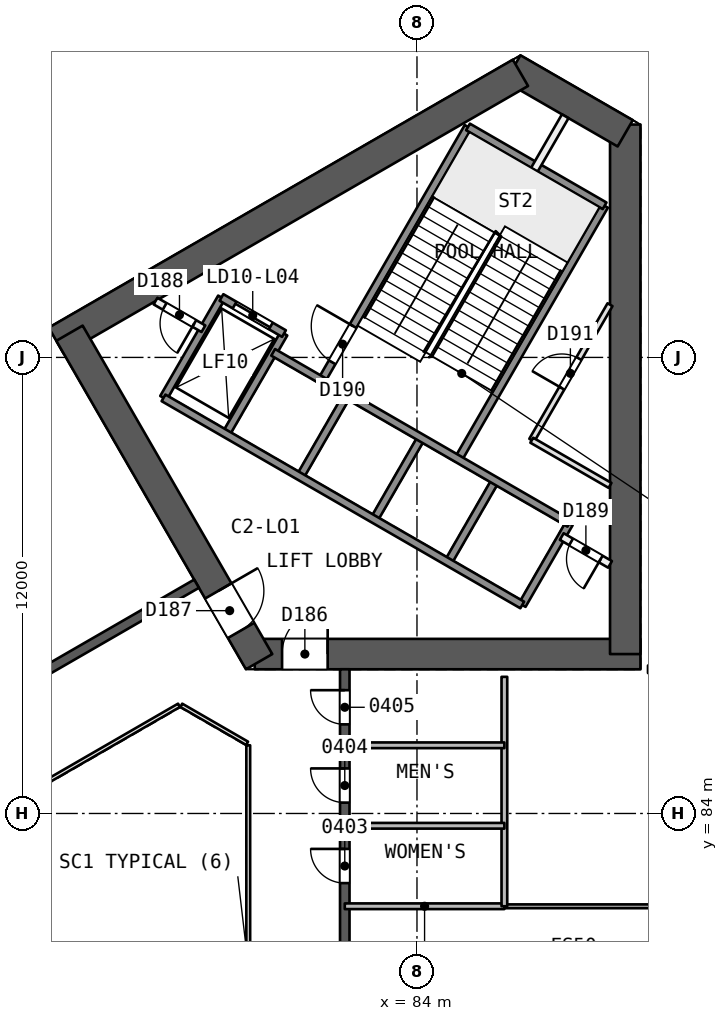
"""IFC4 building model, lengths in metres.
Left out: names, types, materials, properties, quantities, classifications, styles, units other than length and angle.
Written with IfcOpenShell. Run it as: python <this file> out.ifc"""

import sys

from ifc_helpers import new_model, si_unit, direction, frame, frame_2d, origin, place, context, subcontext, project, spatial, rectangle, extrude, element, fill, save


model = new_model("IFC4")
c1 = context("Model", 3, precision=1e-05, world=origin(), true_north=direction((0.0, 1.0)))
c2 = subcontext(c1, "Body", "Model", "MODEL_VIEW")
j1 = project(units=[si_unit("LENGTHUNIT", "METRE"), si_unit("PLANEANGLEUNIT", "RADIAN")], contexts=[c1])
p1 = place(None, origin())
s1 = spatial("IfcSite", under=j1, at=p1, CompositionType="ELEMENT")
p2 = place(p1, origin())
s2 = spatial("IfcBuilding", under=s1, at=p2, CompositionType="ELEMENT")
p3 = place(p2, frame((0.0, 0.0, 25.4)))
s3 = spatial("IfcBuildingStorey", under=s2, at=p3, CompositionType="ELEMENT", Elevation=25.4)
p4 = place(p3, frame((79.731, 88.194, 0.0), z_axis=(0.0, 0.0, 1.0), x_axis=(1.0, 0.0, 0.0)))
e1 = element("IfcWall", 1, at=p4, inside=s3, PredefinedType="SHEAR", context=c2, shape_type="SweptSolid", body=[
    extrude(rectangle(XDim=10.149, YDim=0.8, at=frame_2d((5.074, 0.0))), origin(), (0.0, 0.0, 1.0), 4.6),
])
p5 = place(p4, frame((0.719, 0.0, 0.0)))
e2 = element("IfcOpeningElement", 2, at=p5, cuts=e1, PredefinedType="OPENING", context=c2, shape_type="SweptSolid", body=[
    extrude(rectangle(XDim=1.2, YDim=2.1, at=frame_2d((0.6, 1.05))), frame((0.0, 0.411, 0.0), z_axis=(0.0, -1.0, 0.0), x_axis=(1.0, 0.0, 0.0)), (0.0, 0.0, 1.0), 0.821),
])
p6 = place(p3, frame((89.48, 88.194, 0.0), z_axis=(0.0, 0.0, 1.0), x_axis=(0.0, 1.0, 0.0)))
e3 = element("IfcWall", 3, at=p6, inside=s3, PredefinedType="SHEAR", context=c2, shape_type="SweptSolid", body=[
    extrude(rectangle(XDim=13.933, YDim=0.8, at=frame_2d((6.967, 0.0))), origin(), (0.0, 0.0, 1.0), 4.6),
])
p7 = place(p3, frame((89.48, 101.897, 0.0), z_axis=(0.0, 0.0, 1.0), x_axis=(-0.866034355626, 0.499984494636, 0.0)))
e4 = element("IfcWall", 4, at=p7, inside=s3, PredefinedType="SHEAR", context=c2, shape_type="SweptSolid", body=[
    extrude(rectangle(XDim=3.414, YDim=0.8, at=frame_2d((1.707, 0.0))), origin(), (0.0, 0.0, 1.0), 4.6),
])
p8 = place(p3, frame((86.723, 103.488, 0.0), z_axis=(0.0, 0.0, 1.0), x_axis=(-0.866032504327, -0.499987701298, 0.0)))
e5 = element("IfcWall", 5, at=p8, inside=s3, PredefinedType="SHEAR", context=c2, shape_type="SweptSolid", body=[
    extrude(rectangle(XDim=14.102, YDim=0.8, at=frame_2d((7.051, 0.0))), origin(), (0.0, 0.0, 1.0), 4.6),
])
p9 = place(p3, frame((74.856, 96.637, 0.0), z_axis=(0.0, 0.0, 1.0), x_axis=(0.499993500917, -0.866029155999, 0.0)))
e6 = element("IfcWall", 6, at=p9, inside=s3, PredefinedType="SHEAR", context=c2, shape_type="SweptSolid", body=[
    extrude(rectangle(XDim=9.98, YDim=0.8, at=frame_2d((4.99, 0.0))), origin(), (0.0, 0.0, 1.0), 4.6),
])
p10 = place(p9, frame((7.83, 0.0, 0.0)))
e7 = element("IfcOpeningElement", 7, at=p10, cuts=e6, PredefinedType="OPENING", context=c2, shape_type="SweptSolid", body=[
    extrude(rectangle(XDim=1.2, YDim=2.1, at=frame_2d((0.6, 1.05))), frame((0.0, 0.411, 0.0), z_axis=(0.0, -1.0, 0.0), x_axis=(1.0, 0.0, 0.0)), (0.0, 0.0, 1.0), 0.821),
])
p11 = place(p3, frame((82.1, 72.206, 0.0), z_axis=(0.0, 0.0, 1.0), x_axis=(0.0, 1.0, 0.0)))
e8 = element("IfcWall", 8, at=p11, inside=s3, PredefinedType="SHEAR", context=c2, shape_type="SweptSolid", body=[
    extrude(rectangle(XDim=15.588, YDim=0.25, at=frame_2d((7.794, 0.0))), origin(), (0.0, 0.0, 1.0), 4.1),
])
p12 = place(p11, frame((4.076, 0.0, 0.0)))
e9 = element("IfcOpeningElement", 9, at=p12, cuts=e8, PredefinedType="OPENING", context=c2, shape_type="SweptSolid", body=[
    extrude(rectangle(XDim=1.2, YDim=2.4, at=frame_2d((0.6, 1.2))), frame((0.0, 0.135, 0.0), z_axis=(0.0, -1.0, 0.0), x_axis=(1.0, 0.0, 0.0)), (0.0, 0.0, 1.0), 0.271),
])
p13 = place(p11, frame((9.962, 0.0, 0.0)))
e10 = element("IfcOpeningElement", 10, at=p13, cuts=e8, PredefinedType="OPENING", context=c2, shape_type="SweptSolid", body=[
    extrude(rectangle(XDim=0.9, YDim=2.1, at=frame_2d((0.45, 1.05))), frame((0.0, 0.135, 0.0), z_axis=(0.0, -1.0, 0.0), x_axis=(1.0, 0.0, 0.0)), (0.0, 0.0, 1.0), 0.271),
])
p14 = place(p11, frame((12.08, 0.0, 0.0)))
e11 = element("IfcOpeningElement", 11, at=p14, cuts=e8, PredefinedType="OPENING", context=c2, shape_type="SweptSolid", body=[
    extrude(rectangle(XDim=0.9, YDim=2.1, at=frame_2d((0.45, 1.05))), frame((0.0, 0.135, 0.0), z_axis=(0.0, -1.0, 0.0), x_axis=(1.0, 0.0, 0.0)), (0.0, 0.0, 1.0), 0.271),
])
p15 = place(p11, frame((14.138, 0.0, 0.0)))
e12 = element("IfcOpeningElement", 12, at=p15, cuts=e8, PredefinedType="OPENING", context=c2, shape_type="SweptSolid", body=[
    extrude(rectangle(XDim=0.9, YDim=2.1, at=frame_2d((0.45, 1.05))), frame((0.0, 0.135, 0.0), z_axis=(0.0, -1.0, 0.0), x_axis=(1.0, 0.0, 0.0)), (0.0, 0.0, 1.0), 0.271),
])
p16 = place(p3, frame((78.2, 90.046, 0.0), z_axis=(0.0, 0.0, 1.0), x_axis=(-0.866026492143, -0.499998114903, 0.0)))
e13 = element("IfcWall", 13, at=p16, inside=s3, PredefinedType="SHEAR", context=c2, shape_type="SweptSolid", body=[
    extrude(rectangle(XDim=15.588, YDim=0.25, at=frame_2d((7.794, 0.0))), origin(), (0.0, 0.0, 1.0), 4.1),
])
p17 = place(p16, frame((7.194, 0.0, 0.0)))
e14 = element("IfcOpeningElement", 14, at=p17, cuts=e13, PredefinedType="OPENING", context=c2, shape_type="SweptSolid", body=[
    extrude(rectangle(XDim=1.2, YDim=2.4, at=frame_2d((0.6, 1.2))), frame((0.0, 0.135, 0.0), z_axis=(0.0, -1.0, 0.0), x_axis=(1.0, 0.0, 0.0)), (0.0, 0.0, 1.0), 0.271),
])
p18 = place(p3, frame((91.178, 81.558, 0.0), z_axis=(0.0, 0.0, 1.0), x_axis=(-1.0, 0.0, 0.0)))
e15 = element("IfcWall", 15, at=p18, inside=s3, PredefinedType="PARTITIONING", context=c2, shape_type="SweptSolid", body=[
    extrude(rectangle(XDim=4.878, YDim=0.1, at=frame_2d((2.439, 0.0))), origin(), (0.0, 0.0, 1.0), 4.1),
])
p19 = place(p3, frame((86.3, 81.559, 0.0), z_axis=(0.0, 0.0, 1.0), x_axis=(-1.0, 0.0, 0.0)))
e16 = element("IfcWall", 16, at=p19, inside=s3, PredefinedType="PARTITIONING", context=c2, shape_type="SweptSolid", body=[
    extrude(rectangle(XDim=4.2, YDim=0.15, at=frame_2d((2.1, 0.0))), origin(), (0.0, 0.0, 1.0), 4.1),
])
p20 = place(p3, frame((86.3, 87.595, 0.0), z_axis=(0.0, 0.0, 1.0), x_axis=(0.0, -1.0, 0.0)))
e17 = element("IfcWall", 17, at=p20, inside=s3, PredefinedType="PARTITIONING", context=c2, shape_type="SweptSolid", body=[
    extrude(rectangle(XDim=6.036, YDim=0.15, at=frame_2d((3.018, 0.0))), origin(), (0.0, 0.0, 1.0), 4.1),
])
p21 = place(p3, frame((96.537, 87.794, 0.0), z_axis=(0.0, 0.0, 1.0), x_axis=(-1.0, 0.0, 0.0)))
e18 = element("IfcWall", 18, at=p21, inside=s3, PredefinedType="PARTITIONING", context=c2, shape_type="SweptSolid", body=[
    extrude(rectangle(XDim=6.458, YDim=0.2, at=frame_2d((3.229, 0.0))), origin(), (0.0, 0.0, 1.0), 4.1),
])
p22 = place(p21, frame((2.675, 0.0, 0.0)))
e19 = element("IfcOpeningElement", 19, at=p22, cuts=e18, PredefinedType="OPENING", context=c2, shape_type="SweptSolid", body=[
    extrude(rectangle(XDim=1.2, YDim=2.4, at=frame_2d((0.6, 1.2))), frame((0.0, 0.11, 0.0), z_axis=(0.0, -1.0, 0.0), x_axis=(1.0, 0.0, 0.0)), (0.0, 0.0, 1.0), 0.221),
])
for number, where, z_axis, x_axis in (
    (20, (86.3, 83.677, 0.0), (0.0, 0.0, 1.0), (-1.0, 0.0, 0.0)),
    (21, (86.3, 85.794, 0.0), (0.0, 0.0, 1.0), (-1.0, 0.0, 0.0)),
):
    element("IfcWall", number, at=place(p3, frame(where, z_axis=z_axis, x_axis=x_axis)), inside=s3, PredefinedType="PARTITIONING", context=c2, shape_type="SweptSolid", body=[
        extrude(rectangle(XDim=4.2, YDim=0.15, at=frame_2d((2.1, 0.0))), origin(), (0.0, 0.0, 1.0), 4.1),
    ])
p23 = place(p3, frame((86.77, 89.486, 0.0), z_axis=(0.0, 0.0, 1.0), x_axis=(0.499961042966, 0.86604789447, 0.0)))
e22 = element("IfcWall", 22, at=p23, inside=s3, PredefinedType="SOLIDWALL", context=c2, shape_type="SweptSolid", body=[
    extrude(rectangle(XDim=2.48, YDim=0.2, at=frame_2d((1.24, 0.0))), origin(), (0.0, 0.0, 1.0), 4.1),
])
p24 = place(p3, frame((87.021, 93.821, 0.0), z_axis=(0.0, 0.0, 1.0), x_axis=(0.500028662945, 0.866008854593, 0.0)))
e23 = element("IfcWall", 23, at=p24, inside=s3, PredefinedType="PARTITIONING", context=c2, shape_type="SweptSolid", body=[
    extrude(rectangle(XDim=4.118, YDim=0.15, at=frame_2d((2.059, 0.0))), origin(), (0.0, 0.0, 1.0), 4.1),
])
p25 = place(p24, frame((1.582, 0.0, 0.0)))
e24 = element("IfcOpeningElement", 24, at=p25, cuts=e23, PredefinedType="OPENING", context=c2, shape_type="SweptSolid", body=[
    extrude(rectangle(XDim=0.9, YDim=2.1, at=frame_2d((0.45, 1.05))), frame((0.0, 0.085, 0.0), z_axis=(0.0, -1.0, 0.0), x_axis=(1.0, 0.0, 0.0)), (0.0, 0.0, 1.0), 0.171),
])
p26 = place(p3, frame((84.821, 90.611, 0.0), z_axis=(0.0, 0.0, 1.0), x_axis=(0.499961042966, 0.86604789447, 0.0)))
e25 = element("IfcWall", 25, at=p26, inside=s3, PredefinedType="SOLIDWALL", context=c2, shape_type="SweptSolid", body=[
    extrude(rectangle(XDim=2.48, YDim=0.2, at=frame_2d((1.24, 0.0))), origin(), (0.0, 0.0, 1.0), 4.1),
])
p27 = place(p3, frame((85.087, 93.321, 0.0), z_axis=(0.0, 0.0, 1.0), x_axis=(0.500019787375, 0.866013979237, 0.0)))
e26 = element("IfcWall", 26, at=p27, inside=s3, PredefinedType="SOLIDWALL", context=c2, shape_type="SweptSolid", body=[
    extrude(rectangle(XDim=7.7, YDim=0.2, at=frame_2d((3.85, 0.0))), origin(), (0.0, 0.0, 1.0), 4.1),
])
p28 = place(p3, frame((82.873, 91.736, 0.0), z_axis=(0.0, 0.0, 1.0), x_axis=(0.499961042966, 0.86604789447, 0.0)))
e27 = element("IfcWall", 27, at=p28, inside=s3, PredefinedType="SOLIDWALL", context=c2, shape_type="SweptSolid", body=[
    extrude(rectangle(XDim=2.48, YDim=0.2, at=frame_2d((1.24, 0.0))), origin(), (0.0, 0.0, 1.0), 4.1),
])
p29 = place(p3, frame((87.09, 100.94, 0.0), z_axis=(0.0, 0.0, 1.0), x_axis=(0.499956811548, 0.866050337213, 0.0)))
e28 = element("IfcWall", 28, at=p29, inside=s3, PredefinedType="PARTITIONING", context=c2, shape_type="SweptSolid", body=[
    extrude(rectangle(XDim=1.623, YDim=0.2, at=frame_2d((0.812, 0.0))), origin(), (0.0, 0.0, 1.0), 4.1),
])
p30 = place(p3, frame((80.924, 92.861, 0.0), z_axis=(0.0, 0.0, 1.0), x_axis=(0.499961042966, 0.86604789447, 0.0)))
e29 = element("IfcWall", 29, at=p30, inside=s3, PredefinedType="SOLIDWALL", context=c2, shape_type="SweptSolid", body=[
    extrude(rectangle(XDim=2.48, YDim=0.2, at=frame_2d((1.24, 0.0))), origin(), (0.0, 0.0, 1.0), 4.1),
])
p31 = place(p3, frame((81.493, 95.396, 0.0), z_axis=(0.0, 0.0, 1.0), x_axis=(0.500006057782, 0.866021906294, 0.0)))
e30 = element("IfcWall", 30, at=p31, inside=s3, PredefinedType="SOLIDWALL", context=c2, shape_type="SweptSolid", body=[
    extrude(rectangle(XDim=7.7, YDim=0.2, at=frame_2d((3.85, 0.0))), origin(), (0.0, 0.0, 1.0), 4.1),
])
p32 = place(p31, frame((0.55, 0.0, 0.0)))
e31 = element("IfcOpeningElement", 31, at=p32, cuts=e30, PredefinedType="OPENING", context=c2, shape_type="SweptSolid", body=[
    extrude(rectangle(XDim=1.1, YDim=2.1, at=frame_2d((0.55, 1.05))), frame((0.0, 0.11, 0.0), z_axis=(0.0, -1.0, 0.0), x_axis=(1.0, 0.0, 0.0)), (0.0, 0.0, 1.0), 0.221),
])
for number, where, z_axis, x_axis in (
    (32, (78.976, 93.986, 0.0), (0.0, 0.0, 1.0), (0.5, 0.866, 0.0)),
    (33, (77.33, 94.936, 0.0), (0.0, 0.0, 1.0), (0.5, 0.866, 0.0)),
):
    element("IfcWall", number, at=place(p3, frame(where, z_axis=z_axis, x_axis=x_axis)), inside=s3, PredefinedType="SOLIDWALL", context=c2, shape_type="SweptSolid", body=[
        extrude(rectangle(XDim=3.05, YDim=0.2, at=frame_2d((1.525, 0.0))), origin(), (0.0, 0.0, 1.0), 4.1),
    ])
p33 = place(p3, frame((86.77, 89.486, 0.0), z_axis=(0.0, 0.0, 1.0), x_axis=(-0.86601811187, 0.500012629753, 0.0)))
e34 = element("IfcWall", 34, at=p33, inside=s3, PredefinedType="SOLIDWALL", context=c2, shape_type="SweptSolid", body=[
    extrude(rectangle(XDim=10.9, YDim=0.2, at=frame_2d((5.45, 0.0))), origin(), (0.0, 0.0, 1.0), 4.1),
])
p34 = place(p3, frame((89.08, 90.554, 0.0), z_axis=(0.0, 0.0, 1.0), x_axis=(-0.866022048785, 0.500005810984, 0.0)))
e35 = element("IfcWall", 35, at=p34, inside=s3, PredefinedType="PARTITIONING", context=c2, shape_type="SweptSolid", body=[
    extrude(rectangle(XDim=1.467, YDim=0.2, at=frame_2d((0.733, 0.0))), origin(), (0.0, 0.0, 1.0), 4.1),
])
p35 = place(p34, frame((0.283, 0.0, 0.0)))
e36 = element("IfcOpeningElement", 36, at=p35, cuts=e35, PredefinedType="OPENING", context=c2, shape_type="SweptSolid", body=[
    extrude(rectangle(XDim=0.9, YDim=2.1, at=frame_2d((0.45, 1.05))), frame((0.0, 0.11, 0.0), z_axis=(0.0, -1.0, 0.0), x_axis=(1.0, 0.0, 0.0)), (0.0, 0.0, 1.0), 0.221),
])
p36 = place(p3, frame((78.38, 96.755, 0.0), z_axis=(0.0, 0.0, 1.0), x_axis=(-0.866003949776, 0.500037157592, 0.0)))
e37 = element("IfcWall", 37, at=p36, inside=s3, PredefinedType="PARTITIONING", context=c2, shape_type="SweptSolid", body=[
    extrude(rectangle(XDim=1.455, YDim=0.2, at=frame_2d((0.728, 0.0))), origin(), (0.0, 0.0, 1.0), 4.1),
])
p37 = place(p36, frame((0.278, 0.0, 0.0)))
e38 = element("IfcOpeningElement", 38, at=p37, cuts=e37, PredefinedType="OPENING", context=c2, shape_type="SweptSolid", body=[
    extrude(rectangle(XDim=0.9, YDim=2.1, at=frame_2d((0.45, 1.05))), frame((0.0, 0.11, 0.0), z_axis=(0.0, -1.0, 0.0), x_axis=(1.0, 0.0, 0.0)), (0.0, 0.0, 1.0), 0.221),
])
p38 = place(p3, frame((88.01, 91.634, 0.0), z_axis=(0.0, 0.0, 1.0), x_axis=(-0.866024315419, 0.5000018851, 0.0)))
e39 = element("IfcWall", 39, at=p38, inside=s3, PredefinedType="SOLIDWALL", context=c2, shape_type="SweptSolid", body=[
    extrude(rectangle(XDim=9.0, YDim=0.2, at=frame_2d((4.5, 0.0))), origin(), (0.0, 0.0, 1.0), 4.1),
])
p39 = place(p3, frame((80.5, 96.627, 0.0), z_axis=(0.0, 0.0, 1.0), x_axis=(-0.86601224135, 0.500022797313, 0.0)))
e40 = element("IfcWall", 40, at=p39, inside=s3, PredefinedType="SOLIDWALL", context=c2, shape_type="SweptSolid", body=[
    extrude(rectangle(XDim=1.9, YDim=0.2, at=frame_2d((0.95, 0.0))), origin(), (0.0, 0.0, 1.0), 4.1),
])
p40 = place(p39, frame((0.4, 0.0, 0.0)))
e41 = element("IfcOpeningElement", 41, at=p40, cuts=e40, PredefinedType="OPENING", context=c2, shape_type="SweptSolid", body=[
    extrude(rectangle(XDim=1.1, YDim=2.1, at=frame_2d((0.55, 1.05))), frame((0.0, 0.11, 0.0), z_axis=(0.0, -1.0, 0.0), x_axis=(1.0, 0.0, 0.0)), (0.0, 0.0, 1.0), 0.221),
])
p41 = place(p3, frame((89.08, 92.632, 0.0), z_axis=(0.0, 0.0, 1.0), x_axis=(-0.866041951395, 0.499971337603, 0.0)))
e42 = element("IfcWall", 42, at=p41, inside=s3, PredefinedType="PARTITIONING", context=c2, shape_type="SweptSolid", body=[
    extrude(rectangle(XDim=2.378, YDim=0.15, at=frame_2d((1.189, 0.0))), origin(), (0.0, 0.0, 1.0), 4.1),
])
p42 = place(p3, frame((88.937, 99.99, 0.0), z_axis=(0.0, 0.0, 1.0), x_axis=(-0.866004344652, 0.500036473714, 0.0)))
e43 = element("IfcWall", 43, at=p42, inside=s3, PredefinedType="SOLIDWALL", context=c2, shape_type="SweptSolid", body=[
    extrude(rectangle(XDim=4.15, YDim=0.2, at=frame_2d((2.075, 0.0))), origin(), (0.0, 0.0, 1.0), 4.1),
])
p43 = place(p3, frame((79.56, 74.206, 0.0), z_axis=(0.0, 0.0, 1.0), x_axis=(0.0, 1.0, 0.0)))
e44 = element("IfcWall", 44, at=p43, inside=s3, PredefinedType="PARTITIONING", context=c2, shape_type="SweptSolid", body=[
    extrude(rectangle(XDim=11.588, YDim=0.1, at=frame_2d((5.794, 0.0))), origin(), (0.0, 0.0, 1.0), 4.1),
])
p44 = place(p3, frame((79.53, 85.846, 0.0), z_axis=(0.0, 0.0, 1.0), x_axis=(-0.866041268327, 0.499972520799, 0.0)))
e45 = element("IfcWall", 45, at=p44, inside=s3, PredefinedType="PARTITIONING", context=c2, shape_type="SweptSolid", body=[
    extrude(rectangle(XDim=2.0, YDim=0.1, at=frame_2d((1.0, 0.0))), origin(), (0.0, 0.0, 1.0), 4.1),
])
p45 = place(p3, frame((77.738, 86.846, 0.0), z_axis=(0.0, 0.0, 1.0), x_axis=(-0.866026658274, -0.499997827154, 0.0)))
e46 = element("IfcWall", 46, at=p45, inside=s3, PredefinedType="PARTITIONING", context=c2, shape_type="SweptSolid", body=[
    extrude(rectangle(XDim=11.588, YDim=0.1, at=frame_2d((5.794, 0.0))), origin(), (0.0, 0.0, 1.0), 4.1),
])
p46 = place(p13, origin())
e47 = element("IfcDoor", 47, at=p46, inside=s3, OperationType="SINGLE_SWING_RIGHT", PredefinedType="NOTDEFINED", context=c2, shape_type="SweptSolid", body=[
    extrude(rectangle(XDim=0.9, YDim=2.1, at=frame_2d((0.45, 1.05))), frame((0.0, 0.025, 0.0), z_axis=(0.0, -1.0, 0.0), x_axis=(1.0, 0.0, 0.0)), (0.0, 0.0, 1.0), 0.05),
])
fill(e10, e47)
p47 = place(p14, origin())
e48 = element("IfcDoor", 48, at=p47, inside=s3, OperationType="SINGLE_SWING_RIGHT", PredefinedType="NOTDEFINED", context=c2, shape_type="SweptSolid", body=[
    extrude(rectangle(XDim=0.9, YDim=2.1, at=frame_2d((0.45, 1.05))), frame((0.0, 0.025, 0.0), z_axis=(0.0, -1.0, 0.0), x_axis=(1.0, 0.0, 0.0)), (0.0, 0.0, 1.0), 0.05),
])
fill(e11, e48)
p48 = place(p15, origin())
e49 = element("IfcDoor", 49, at=p48, inside=s3, OperationType="SINGLE_SWING_RIGHT", PredefinedType="NOTDEFINED", context=c2, shape_type="SweptSolid", body=[
    extrude(rectangle(XDim=0.9, YDim=2.1, at=frame_2d((0.45, 1.05))), frame((0.0, 0.025, 0.0), z_axis=(0.0, -1.0, 0.0), x_axis=(1.0, 0.0, 0.0)), (0.0, 0.0, 1.0), 0.05),
])
fill(e12, e49)
p49 = place(p5, origin())
e50 = element("IfcDoor", 50, at=p49, inside=s3, OperationType="SINGLE_SWING_RIGHT", PredefinedType="NOTDEFINED", context=c2, shape_type="SweptSolid", body=[
    extrude(rectangle(XDim=1.2, YDim=2.1, at=frame_2d((0.6, 1.05))), frame((0.0, 0.025, 0.0), z_axis=(0.0, -1.0, 0.0), x_axis=(1.0, 0.0, 0.0)), (0.0, 0.0, 1.0), 0.05),
])
fill(e2, e50)
p50 = place(p10, origin())
e51 = element("IfcDoor", 51, at=p50, inside=s3, OperationType="SINGLE_SWING_LEFT", PredefinedType="NOTDEFINED", context=c2, shape_type="SweptSolid", body=[
    extrude(rectangle(XDim=1.2, YDim=2.1, at=frame_2d((0.6, 1.05))), frame((0.0, 0.025, 0.0), z_axis=(0.0, -1.0, 0.0), x_axis=(1.0, 0.0, 0.0)), (0.0, 0.0, 1.0), 0.05),
])
fill(e7, e51)
p51 = place(p40, origin())
e52 = element("IfcDoor", 52, at=p51, inside=s3, OperationType="SLIDING_TO_RIGHT", PredefinedType="NOTDEFINED", context=c2, shape_type="SweptSolid", body=[
    extrude(rectangle(XDim=1.1, YDim=2.1, at=frame_2d((0.55, 1.05))), frame((0.0, 0.025, 0.0), z_axis=(0.0, -1.0, 0.0), x_axis=(1.0, 0.0, 0.0)), (0.0, 0.0, 1.0), 0.05),
])
fill(e41, e52)
p52 = place(p37, origin())
e53 = element("IfcDoor", 53, at=p52, inside=s3, OperationType="SINGLE_SWING_LEFT", PredefinedType="NOTDEFINED", context=c2, shape_type="SweptSolid", body=[
    extrude(rectangle(XDim=0.9, YDim=2.1, at=frame_2d((0.45, 1.05))), frame((0.0, 0.025, 0.0), z_axis=(0.0, -1.0, 0.0), x_axis=(1.0, 0.0, 0.0)), (0.0, 0.0, 1.0), 0.05),
])
fill(e38, e53)
p53 = place(p35, origin())
e54 = element("IfcDoor", 54, at=p53, inside=s3, OperationType="SINGLE_SWING_LEFT", PredefinedType="NOTDEFINED", context=c2, shape_type="SweptSolid", body=[
    extrude(rectangle(XDim=0.9, YDim=2.1, at=frame_2d((0.45, 1.05))), frame((0.0, 0.025, 0.0), z_axis=(0.0, -1.0, 0.0), x_axis=(1.0, 0.0, 0.0)), (0.0, 0.0, 1.0), 0.05),
])
fill(e36, e54)
p54 = place(p32, origin())
e55 = element("IfcDoor", 55, at=p54, inside=s3, OperationType="SINGLE_SWING_RIGHT", PredefinedType="NOTDEFINED", context=c2, shape_type="SweptSolid", body=[
    extrude(rectangle(XDim=1.1, YDim=2.1, at=frame_2d((0.55, 1.05))), frame((0.0, 0.025, 0.0), z_axis=(0.0, -1.0, 0.0), x_axis=(1.0, 0.0, 0.0)), (0.0, 0.0, 1.0), 0.05),
])
fill(e31, e55)
p55 = place(p25, origin())
e56 = element("IfcDoor", 56, at=p55, inside=s3, OperationType="SINGLE_SWING_LEFT", PredefinedType="NOTDEFINED", context=c2, shape_type="SweptSolid", body=[
    extrude(rectangle(XDim=0.9, YDim=2.1, at=frame_2d((0.45, 1.05))), frame((0.0, 0.025, 0.0), z_axis=(0.0, -1.0, 0.0), x_axis=(1.0, 0.0, 0.0)), (0.0, 0.0, 1.0), 0.05),
])
fill(e24, e56)
save(model, sys.argv[1])
